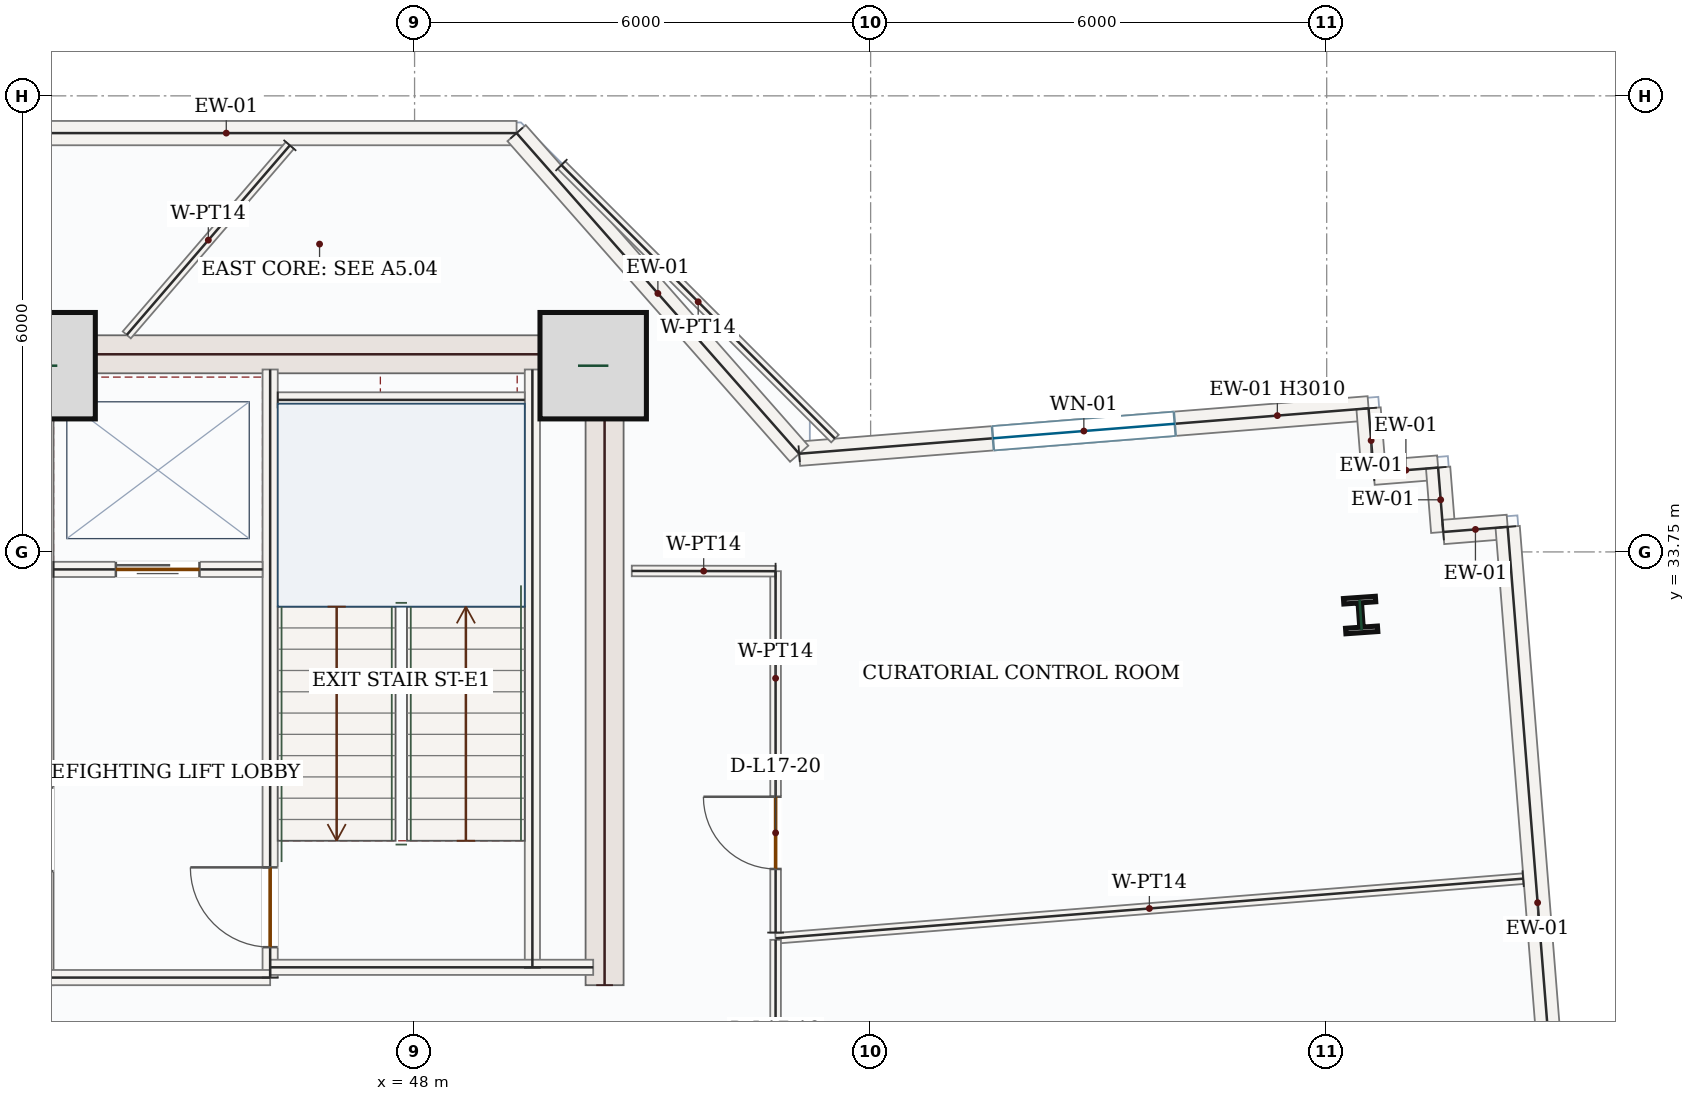
"""IFC4 building model, lengths in metres.
Left out: names, types, materials, properties, quantities, classifications, styles, units other than length and angle.
Written with IfcOpenShell. Run it as: python <this file> out.ifc"""

import sys

from ifc_helpers import new_model, si_unit, direction, frame, frame_2d, origin, origin_2d, place, context, subcontext, project, spatial, rectangle, i_section, extrude, source, transform, mapped, element, fill, save


model = new_model("IFC4")
c1 = context("Model", 3, precision=1e-05, world=origin(), true_north=direction((0.0, 1.0)))
c2 = subcontext(c1, "Body", "Model", "MODEL_VIEW")
j1 = project(units=[si_unit("LENGTHUNIT", "METRE"), si_unit("PLANEANGLEUNIT", "RADIAN")], contexts=[c1])
p1 = place(None, origin())
s1 = spatial("IfcSite", under=j1, at=p1, CompositionType="ELEMENT")
p2 = place(p1, origin())
s2 = spatial("IfcBuilding", under=s1, at=p2, CompositionType="ELEMENT")
p3 = place(p2, frame((0.0, 0.0, 79.5)))
s3 = spatial("IfcBuildingStorey", under=s2, at=p3, CompositionType="ELEMENT", Elevation=79.5)
p4 = place(p3, frame((43.0, 28.05, 0.0), z_axis=(0.0, 0.0, 1.0), x_axis=(0.0, 1.0, 0.0)))
e1 = element("IfcWall", 1, at=p4, inside=s3, PredefinedType="SHEAR", context=c2, shape_type="SweptSolid", body=[
    extrude(rectangle(XDim=8.55, YDim=0.5, at=frame_2d((4.275, 0.0))), origin(), (0.0, 0.0, 1.0), 3.95),
])
p5 = place(p4, frame((1.5, 0.0, 0.0)))
e2 = element("IfcOpeningElement", 2, at=p5, cuts=e1, PredefinedType="OPENING", context=c2, shape_type="SweptSolid", body=[
    extrude(rectangle(XDim=1.1, YDim=2.2, at=frame_2d((0.55, 1.1))), frame((0.0, 0.26, 0.0), z_axis=(0.0, -1.0, 0.0), x_axis=(1.0, 0.0, 0.0)), (0.0, 0.0, 1.0), 0.52),
])
m1 = source(origin(), c2, "Body", "SweptSolid", [
    extrude(rectangle(XDim=8.55, YDim=0.5, at=frame_2d((4.275, 0.0))), origin(), (0.0, 0.0, 1.0), 3.95),
])
p6 = place(p3, frame((50.5, 28.05, 0.0), z_axis=(0.0, 0.0, 1.0), x_axis=(0.0, 1.0, 0.0)))
e3 = element("IfcWall", 3, at=p6, inside=s3, PredefinedType="SHEAR", context=c2, shape_type="MappedRepresentation", body=[
    mapped(m1, transform((0.0, 0.0, 0.0), x_axis=(1.0, 0.0, 0.0), y_axis=(0.0, 1.0, 0.0), z_axis=(0.0, 0.0, 1.0), scale=1.0)),
])
m2 = source(origin(), c2, "Body", "SweptSolid", [
    extrude(rectangle(XDim=7.0, YDim=0.5, at=frame_2d((3.5, 0.0))), origin(), (0.0, 0.0, 1.0), 3.95),
])
p7 = place(p3, frame((43.25, 36.35, 0.0), z_axis=(0.0, 0.0, 1.0), x_axis=(1.0, 0.0, 0.0)))
e4 = element("IfcWall", 4, at=p7, inside=s3, PredefinedType="SHEAR", context=c2, shape_type="MappedRepresentation", body=[
    mapped(m2, transform((0.0, 0.0, 0.0), x_axis=(1.0, 0.0, 0.0), y_axis=(0.0, 1.0, 0.0), z_axis=(0.0, 0.0, 1.0), scale=1.0)),
])
m3 = source(origin(), c2, "Body", "SweptSolid", [
    extrude(rectangle(XDim=1.4, YDim=1.4, at=origin_2d()), origin(), (0.0, 0.0, 1.0), 4.2),
])
for number, where, z_axis, x_axis in (
    (5, (43.1, 36.2, 0.0), (0.0, 0.0, 1.0), (1.0, 0.0, 0.0)),
    (6, (50.35, 36.2, 0.0), (0.0, 0.0, 1.0), (1.0, 0.0, 0.0)),
):
    element("IfcColumn", number, at=place(p3, frame(where, z_axis=z_axis, x_axis=x_axis)), inside=s3, PredefinedType="COLUMN", context=c2, shape_type="MappedRepresentation", body=[
        mapped(m3, transform((0.0, 0.0, 0.0), x_axis=(1.0, 0.0, 0.0), y_axis=(0.0, 1.0, 0.0), z_axis=(0.0, 0.0, 1.0), scale=1.0)),
    ])
m4 = source(origin(), c2, "Body", "SweptSolid", [
    extrude(i_section(OverallWidth=0.421, OverallDepth=0.465, WebThickness=0.045, FlangeThickness=0.073, FilletRadius=0.018, at=origin_2d()), origin(), (0.0, 0.0, 1.0), 4.2),
])
p8 = place(p3, frame((60.447, 32.92, 0.0), z_axis=(0.0, 0.0, 1.0), x_axis=(0.99756405026, 0.069756473744, 0.0)))
e7 = element("IfcColumn", 7, at=p8, inside=s3, PredefinedType="COLUMN", context=c2, shape_type="MappedRepresentation", body=[
    mapped(m4, transform((0.0, 0.0, 0.0), x_axis=(1.0, 0.0, 0.0), y_axis=(0.0, 1.0, 0.0), z_axis=(0.0, 0.0, 1.0), scale=1.0)),
])
p9 = place(p3, frame((53.06, 35.042, 0.0), z_axis=(0.0, 0.0, 1.0), x_axis=(0.996834773193, 0.079501163223, 0.0)))
e8 = element("IfcWall", 8, at=p9, inside=s3, PredefinedType="SOLIDWALL", context=c2, shape_type="SweptSolid", body=[
    extrude(rectangle(XDim=7.514, YDim=0.32, at=frame_2d((3.757, 0.0))), origin(), (0.0, 0.0, 1.0), 3.01),
])
p10 = place(p9, frame((2.557, 0.0, 0.85)))
e9 = element("IfcOpeningElement", 9, at=p10, cuts=e8, PredefinedType="OPENING", context=c2, shape_type="SweptSolid", body=[
    extrude(rectangle(XDim=2.4, YDim=1.8, at=frame_2d((1.2, 0.9))), frame((0.0, 0.17, 0.0), z_axis=(0.0, -1.0, 0.0), x_axis=(1.0, 0.0, 0.0)), (0.0, 0.0, 1.0), 0.34),
])
m5 = source(origin(), c2, "Body", "SweptSolid", [
    extrude(rectangle(XDim=0.85, YDim=0.32, at=frame_2d((0.425, 0.0))), origin(), (0.0, 0.0, 1.0), 3.95),
])
p11 = place(p3, frame((60.551, 35.639, 0.0), z_axis=(0.0, 0.0, 1.0), x_axis=(0.079573954853, -0.996828965123, 0.0)))
e10 = element("IfcWall", 10, at=p11, inside=s3, PredefinedType="SOLIDWALL", context=c2, shape_type="MappedRepresentation", body=[
    mapped(m5, transform((0.0, 0.0, 0.0), x_axis=(1.0, 0.0, 0.0), y_axis=(0.0, 1.0, 0.0), z_axis=(0.0, 0.0, 1.0), scale=1.0)),
])
m6 = source(origin(), c2, "Body", "SweptSolid", [
    extrude(rectangle(XDim=0.85, YDim=0.32, at=frame_2d((0.425, 0.0))), origin(), (0.0, 0.0, 1.0), 3.95),
])
for number, where, z_axis, x_axis in (
    (11, (60.618, 34.792, 0.0), (0.0, 0.0, 1.0), (0.997, 0.08, 0.0)),
    (12, (61.466, 34.86, 0.0), (0.0, 0.0, 1.0), (0.08, -0.997, 0.0)),
):
    element("IfcWall", number, at=place(p3, frame(where, z_axis=z_axis, x_axis=x_axis)), inside=s3, PredefinedType="SOLIDWALL", context=c2, shape_type="MappedRepresentation", body=[
        mapped(m6, transform((0.0, 0.0, 0.0), x_axis=(1.0, 0.0, 0.0), y_axis=(0.0, 1.0, 0.0), z_axis=(0.0, 0.0, 1.0), scale=1.0)),
    ])
p12 = place(p3, frame((61.533, 34.012, 0.0), z_axis=(0.0, 0.0, 1.0), x_axis=(0.996851711541, 0.079288493483, 0.0)))
e13 = element("IfcWall", 13, at=p12, inside=s3, PredefinedType="SOLIDWALL", context=c2, shape_type="MappedRepresentation", body=[
    mapped(m5, transform((0.0, 0.0, 0.0), x_axis=(1.0, 0.0, 0.0), y_axis=(0.0, 1.0, 0.0), z_axis=(0.0, 0.0, 1.0), scale=1.0)),
])
m7 = source(origin(), c2, "Body", "SweptSolid", [
    extrude(rectangle(XDim=9.92, YDim=0.32, at=frame_2d((4.96, 0.0))), origin(), (0.0, 0.0, 1.0), 3.95),
])
p13 = place(p3, frame((62.381, 34.08, 0.0), z_axis=(0.0, 0.0, 1.0), x_axis=(0.07949480177, -0.996835280521, 0.0)))
e14 = element("IfcWall", 14, at=p13, inside=s3, PredefinedType="SOLIDWALL", context=c2, shape_type="MappedRepresentation", body=[
    mapped(m7, transform((0.0, 0.0, 0.0), x_axis=(1.0, 0.0, 0.0), y_axis=(0.0, 1.0, 0.0), z_axis=(0.0, 0.0, 1.0), scale=1.0)),
])
m8 = source(origin(), c2, "Body", "SweptSolid", [
    extrude(rectangle(XDim=7.639, YDim=0.32, at=frame_2d((3.819, 0.0))), origin(), (0.0, 0.0, 1.0), 3.95),
])
p14 = place(p3, frame((41.703, 39.26, 0.0), z_axis=(0.0, 0.0, 1.0), x_axis=(1.0, 0.0, 0.0)))
e15 = element("IfcWall", 15, at=p14, inside=s3, PredefinedType="SOLIDWALL", context=c2, shape_type="MappedRepresentation", body=[
    mapped(m8, transform((0.0, 0.0, 0.0), x_axis=(1.0, 0.0, 0.0), y_axis=(0.0, 1.0, 0.0), z_axis=(0.0, 0.0, 1.0), scale=1.0)),
])
m9 = source(origin(), c2, "Body", "SweptSolid", [
    extrude(rectangle(XDim=5.623, YDim=0.32, at=frame_2d((2.812, 0.0))), origin(), (0.0, 0.0, 1.0), 3.95),
])
p15 = place(p3, frame((49.342, 39.26, 0.0), z_axis=(0.0, 0.0, 1.0), x_axis=(0.66122376427, -0.750188731963, 0.0)))
e16 = element("IfcWall", 16, at=p15, inside=s3, PredefinedType="SOLIDWALL", context=c2, shape_type="MappedRepresentation", body=[
    mapped(m9, transform((0.0, 0.0, 0.0), x_axis=(1.0, 0.0, 0.0), y_axis=(0.0, 1.0, 0.0), z_axis=(0.0, 0.0, 1.0), scale=1.0)),
])
m10 = source(origin(), c2, "Body", "SweptSolid", [
    extrude(rectangle(XDim=7.87, YDim=0.2, at=frame_2d((3.935, 0.0))), origin(), (0.0, 0.0, 1.0), 3.95),
])
p16 = place(p3, frame((49.55, 28.28, 0.0), z_axis=(0.0, 0.0, 1.0), x_axis=(0.0, 1.0, 0.0)))
e17 = element("IfcWall", 17, at=p16, inside=s3, PredefinedType="SOLIDWALL", context=c2, shape_type="MappedRepresentation", body=[
    mapped(m10, transform((0.0, 0.0, 0.0), x_axis=(1.0, 0.0, 0.0), y_axis=(0.0, 1.0, 0.0), z_axis=(0.0, 0.0, 1.0), scale=1.0)),
])
p17 = place(p3, frame((46.1, 28.15, 0.0), z_axis=(0.0, 0.0, 1.0), x_axis=(0.0, 1.0, 0.0)))
e18 = element("IfcWall", 18, at=p17, inside=s3, PredefinedType="SOLIDWALL", context=c2, shape_type="SweptSolid", body=[
    extrude(rectangle(XDim=8.0, YDim=0.2, at=frame_2d((4.0, 0.0))), origin(), (0.0, 0.0, 1.0), 3.95),
])
p18 = place(p17, frame((0.4, 0.0, 0.0)))
e19 = element("IfcOpeningElement", 19, at=p18, cuts=e18, PredefinedType="OPENING", context=c2, shape_type="SweptSolid", body=[
    extrude(rectangle(XDim=1.05, YDim=2.15, at=frame_2d((0.525, 1.075))), frame((0.0, 0.11, 0.0), z_axis=(0.0, -1.0, 0.0), x_axis=(1.0, 0.0, 0.0)), (0.0, 0.0, 1.0), 0.22),
])
m11 = source(origin(), c2, "Body", "SweptSolid", [
    extrude(rectangle(XDim=3.0, YDim=0.2, at=frame_2d((1.5, 0.0))), origin(), (0.0, 0.0, 1.0), 3.95),
])
p19 = place(p3, frame((43.1, 28.15, 0.0), z_axis=(0.0, 0.0, 1.0), x_axis=(1.0, 0.0, 0.0)))
e20 = element("IfcWall", 20, at=p19, inside=s3, PredefinedType="SOLIDWALL", context=c2, shape_type="MappedRepresentation", body=[
    mapped(m11, transform((0.0, 0.0, 0.0), x_axis=(1.0, 0.0, 0.0), y_axis=(0.0, 1.0, 0.0), z_axis=(0.0, 0.0, 1.0), scale=1.0)),
])
m12 = source(origin(), c2, "Body", "SweptSolid", [
    extrude(rectangle(XDim=4.25, YDim=0.2, at=frame_2d((2.125, 0.0))), origin(), (0.0, 0.0, 1.0), 3.95),
])
p20 = place(p3, frame((46.1, 28.285, 0.0), z_axis=(0.0, 0.0, 1.0), x_axis=(1.0, 0.0, 0.0)))
e21 = element("IfcWall", 21, at=p20, inside=s3, PredefinedType="SOLIDWALL", context=c2, shape_type="MappedRepresentation", body=[
    mapped(m12, transform((0.0, 0.0, 0.0), x_axis=(1.0, 0.0, 0.0), y_axis=(0.0, 1.0, 0.0), z_axis=(0.0, 0.0, 1.0), scale=1.0)),
])
m13 = source(origin(), c2, "Body", "SweptSolid", [
    extrude(rectangle(XDim=3.25, YDim=0.2, at=frame_2d((1.625, 0.0))), origin(), (0.0, 0.0, 1.0), 3.95),
])
p21 = place(p3, frame((46.2, 35.75, 0.0), z_axis=(0.0, 0.0, 1.0), x_axis=(1.0, 0.0, 0.0)))
e22 = element("IfcWall", 22, at=p21, inside=s3, PredefinedType="SOLIDWALL", context=c2, shape_type="MappedRepresentation", body=[
    mapped(m13, transform((0.0, 0.0, 0.0), x_axis=(1.0, 0.0, 0.0), y_axis=(0.0, 1.0, 0.0), z_axis=(0.0, 0.0, 1.0), scale=1.0)),
])
p22 = place(p3, frame((43.25, 33.52, 0.0), z_axis=(0.0, 0.0, 1.0), x_axis=(1.0, 0.0, 0.0)))
e23 = element("IfcWall", 23, at=p22, inside=s3, PredefinedType="SOLIDWALL", context=c2, shape_type="SweptSolid", body=[
    extrude(rectangle(XDim=2.75, YDim=0.2, at=frame_2d((1.375, 0.0))), origin(), (0.0, 0.0, 1.0), 3.95),
])
p23 = place(p22, frame((0.82, 0.0, 0.0)))
e24 = element("IfcOpeningElement", 24, at=p23, cuts=e23, PredefinedType="OPENING", context=c2, shape_type="SweptSolid", body=[
    extrude(rectangle(XDim=1.1, YDim=2.15, at=frame_2d((0.55, 1.075))), frame((0.0, 0.11, 0.0), z_axis=(0.0, -1.0, 0.0), x_axis=(1.0, 0.0, 0.0)), (0.0, 0.0, 1.0), 0.22),
])
m14 = source(origin(), c2, "Body", "SweptSolid", [
    extrude(rectangle(XDim=3.29, YDim=0.14, at=frame_2d((1.645, 0.0))), origin(), (0.0, 0.0, 1.0), 3.95),
])
p24 = place(p3, frame((46.36, 39.099, 0.0), z_axis=(0.0, 0.0, 1.0), x_axis=(-0.652214149627, -0.758034763732, 0.0)))
e25 = element("IfcWall", 25, at=p24, inside=s3, PredefinedType="PARTITIONING", context=c2, shape_type="MappedRepresentation", body=[
    mapped(m14, transform((0.0, 0.0, 0.0), x_axis=(1.0, 0.0, 0.0), y_axis=(0.0, 1.0, 0.0), z_axis=(0.0, 0.0, 1.0), scale=1.0)),
])
m15 = source(origin(), c2, "Body", "SweptSolid", [
    extrude(rectangle(XDim=5.09, YDim=0.14, at=frame_2d((2.545, 0.0))), origin(), (0.0, 0.0, 1.0), 3.95),
])
p25 = place(p3, frame((49.932, 38.84, 0.0), z_axis=(0.0, 0.0, 1.0), x_axis=(0.707106781187, -0.707106781187, 0.0)))
e26 = element("IfcWall", 26, at=p25, inside=s3, PredefinedType="PARTITIONING", context=c2, shape_type="MappedRepresentation", body=[
    mapped(m15, transform((0.0, 0.0, 0.0), x_axis=(1.0, 0.0, 0.0), y_axis=(0.0, 1.0, 0.0), z_axis=(0.0, 0.0, 1.0), scale=1.0)),
])
m16 = source(origin(), c2, "Body", "SweptSolid", [
    extrude(rectangle(XDim=9.865, YDim=0.14, at=frame_2d((4.933, 0.0))), origin(), (0.0, 0.0, 1.0), 3.95),
])
p26 = place(p3, frame((62.584, 29.451, 0.0), z_axis=(0.0, 0.0, 1.0), x_axis=(-0.996833900052, -0.079512110446, 0.0)))
e27 = element("IfcWall", 27, at=p26, inside=s3, PredefinedType="PARTITIONING", context=c2, shape_type="MappedRepresentation", body=[
    mapped(m16, transform((0.0, 0.0, 0.0), x_axis=(1.0, 0.0, 0.0), y_axis=(0.0, 1.0, 0.0), z_axis=(0.0, 0.0, 1.0), scale=1.0)),
])
p27 = place(p3, frame((52.75, 28.742, 0.0), z_axis=(0.0, 0.0, 1.0), x_axis=(-0.000102701037, 0.999999994726, 0.0)))
e28 = element("IfcWall", 28, at=p27, inside=s3, PredefinedType="PARTITIONING", context=c2, shape_type="SweptSolid", body=[
    extrude(rectangle(XDim=4.754, YDim=0.14, at=frame_2d((2.377, 0.0))), origin(), (0.0, 0.0, 1.0), 3.95),
])
p28 = place(p27, frame((0.837, 0.0, 0.0)))
e29 = element("IfcOpeningElement", 29, at=p28, cuts=e28, PredefinedType="OPENING", context=c2, shape_type="SweptSolid", body=[
    extrude(rectangle(XDim=0.95, YDim=2.15, at=frame_2d((0.475, 1.075))), frame((0.0, 0.08, 0.0), z_axis=(0.0, -1.0, 0.0), x_axis=(1.0, 0.0, 0.0)), (0.0, 0.0, 1.0), 0.16),
])
m17 = source(origin(), c2, "Body", "SweptSolid", [
    extrude(rectangle(XDim=1.892, YDim=0.14, at=frame_2d((0.946, 0.0))), origin(), (0.0, 0.0, 1.0), 3.95),
])
p29 = place(p3, frame((52.75, 33.497, 0.0), z_axis=(0.0, 0.0, 1.0), x_axis=(-0.999998592772, 0.001677633463, 0.0)))
e30 = element("IfcWall", 30, at=p29, inside=s3, PredefinedType="PARTITIONING", context=c2, shape_type="MappedRepresentation", body=[
    mapped(m17, transform((0.0, 0.0, 0.0), x_axis=(1.0, 0.0, 0.0), y_axis=(0.0, 1.0, 0.0), z_axis=(0.0, 0.0, 1.0), scale=1.0)),
])
p30 = place(p3, frame((52.745, 20.576, 0.0), z_axis=(0.0, 0.0, 1.0), x_axis=(0.000604997167, 0.999999816989, 0.0)))
e31 = element("IfcWall", 31, at=p30, inside=s3, PredefinedType="PARTITIONING", context=c2, shape_type="SweptSolid", body=[
    extrude(rectangle(XDim=8.071, YDim=0.14, at=frame_2d((4.035, 0.0))), origin(), (0.0, 0.0, 1.0), 3.95),
])
p31 = place(p30, frame((5.554, 0.0, 0.0)))
e32 = element("IfcOpeningElement", 32, at=p31, cuts=e31, PredefinedType="OPENING", context=c2, shape_type="SweptSolid", body=[
    extrude(rectangle(XDim=0.95, YDim=2.15, at=frame_2d((0.475, 1.075))), frame((0.0, 0.08, 0.0), z_axis=(0.0, -1.0, 0.0), x_axis=(1.0, 0.0, 0.0)), (0.0, 0.0, 1.0), 0.16),
])
m18 = source(origin(), c2, "Body", "SweptSolid", [
    extrude(rectangle(XDim=2.4, YDim=1.8, at=frame_2d((1.2, 0.9))), frame((0.0, 0.03, 0.0), z_axis=(0.0, -1.0, 0.0), x_axis=(1.0, 0.0, 0.0)), (0.0, 0.0, 1.0), 0.06),
])
p32 = place(p10, origin())
e33 = element("IfcWindow", 33, at=p32, inside=s3, PartitioningType="DOUBLE_PANEL_VERTICAL", PredefinedType="WINDOW", context=c2, shape_type="MappedRepresentation", body=[
    mapped(m18, transform((0.0, 0.0, 0.0), x_axis=(1.0, 0.0, 0.0), y_axis=(0.0, 1.0, 0.0), z_axis=(0.0, 0.0, 1.0), scale=1.0)),
])
fill(e9, e33)
m19 = source(origin(), c2, "Body", "SweptSolid", [
    extrude(rectangle(XDim=1.05, YDim=2.15, at=frame_2d((0.525, 1.075))), frame((0.0, 0.025, 0.0), z_axis=(0.0, -1.0, 0.0), x_axis=(1.0, 0.0, 0.0)), (0.0, 0.0, 1.0), 0.05),
])
p33 = place(p18, origin())
e34 = element("IfcDoor", 34, at=p33, inside=s3, OperationType="SINGLE_SWING_RIGHT", PredefinedType="DOOR", context=c2, shape_type="MappedRepresentation", body=[
    mapped(m19, transform((0.0, 0.0, 0.0), x_axis=(1.0, 0.0, 0.0), y_axis=(0.0, 1.0, 0.0), z_axis=(0.0, 0.0, 1.0), scale=1.0)),
])
fill(e19, e34)
m20 = source(origin(), c2, "Body", "SweptSolid", [
    extrude(rectangle(XDim=1.1, YDim=2.15, at=frame_2d((0.55, 1.075))), frame((0.0, 0.025, 0.0), z_axis=(0.0, -1.0, 0.0), x_axis=(1.0, 0.0, 0.0)), (0.0, 0.0, 1.0), 0.05),
])
p34 = place(p23, origin())
e35 = element("IfcDoor", 35, at=p34, inside=s3, OperationType="DOUBLE_DOOR_SLIDING", PredefinedType="DOOR", context=c2, shape_type="MappedRepresentation", body=[
    mapped(m20, transform((0.0, 0.0, 0.0), x_axis=(1.0, 0.0, 0.0), y_axis=(0.0, 1.0, 0.0), z_axis=(0.0, 0.0, 1.0), scale=1.0)),
])
fill(e24, e35)
m21 = source(origin(), c2, "Body", "SweptSolid", [
    extrude(rectangle(XDim=0.95, YDim=2.15, at=frame_2d((0.475, 1.075))), frame((0.0, 0.025, 0.0), z_axis=(0.0, -1.0, 0.0), x_axis=(1.0, 0.0, 0.0)), (0.0, 0.0, 1.0), 0.05),
])
p35 = place(p28, origin())
e36 = element("IfcDoor", 36, at=p35, inside=s3, OperationType="SINGLE_SWING_RIGHT", PredefinedType="DOOR", context=c2, shape_type="MappedRepresentation", body=[
    mapped(m21, transform((0.0, 0.0, 0.0), x_axis=(1.0, 0.0, 0.0), y_axis=(0.0, 1.0, 0.0), z_axis=(0.0, 0.0, 1.0), scale=1.0)),
])
fill(e29, e36)
save(model, sys.argv[1])
